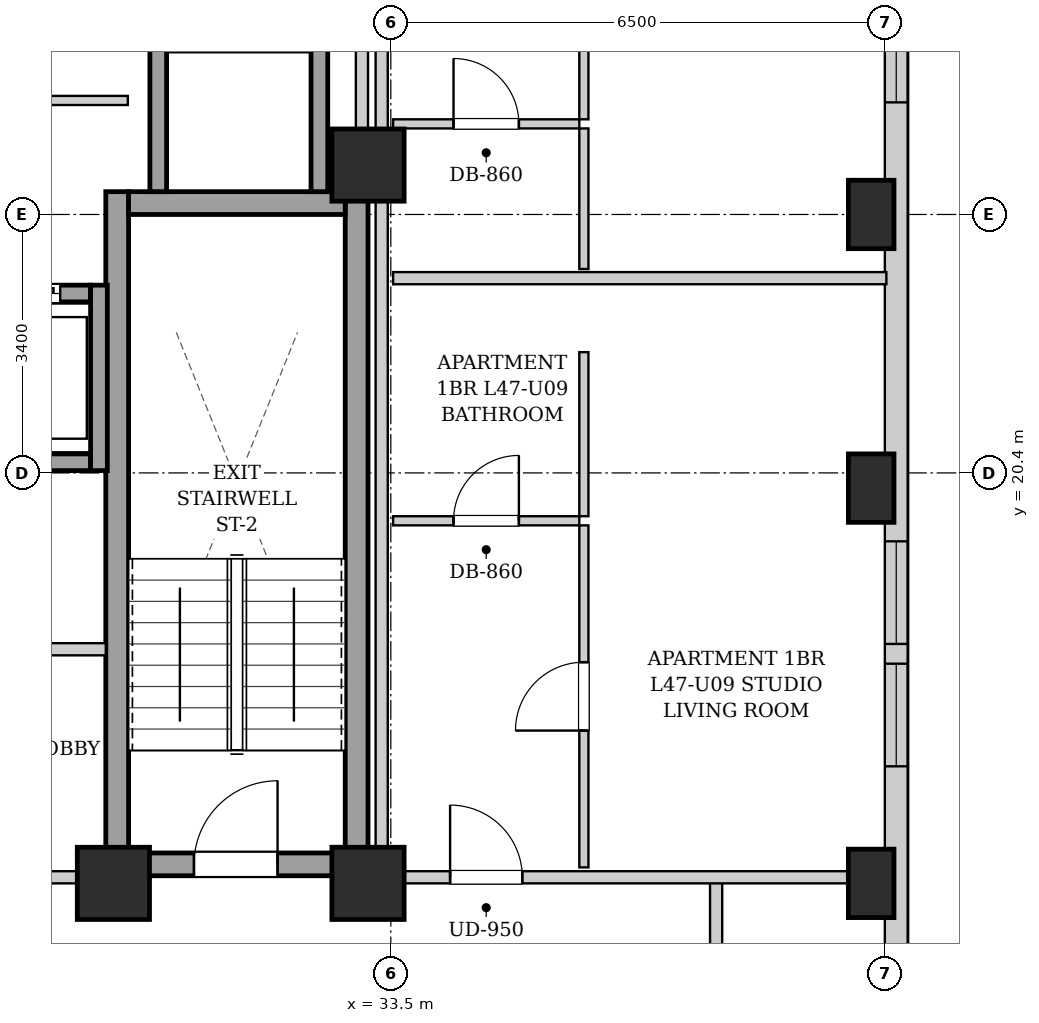
"""IFC4 building model, lengths in metres.
Left out: names, types, materials, properties, quantities, classifications, styles, units other than length and angle.
Written with IfcOpenShell. Run it as: python <this file> out.ifc"""

import sys

from ifc_helpers import new_model, si_unit, direction, frame, frame_2d, origin, origin_2d, place, context, subcontext, project, spatial, rectangle, extrude, element, fill, save


model = new_model("IFC4")
c1 = context("Model", 3, precision=1e-05, world=origin(), true_north=direction((0.0, 1.0)))
c2 = subcontext(c1, "Body", "Model", "MODEL_VIEW")
j1 = project(units=[si_unit("LENGTHUNIT", "METRE"), si_unit("PLANEANGLEUNIT", "RADIAN")], contexts=[c1])
p1 = place(None, origin())
s1 = spatial("IfcSite", under=j1, at=p1, CompositionType="ELEMENT")
p2 = place(p1, origin())
s2 = spatial("IfcBuilding", under=s1, at=p2, CompositionType="ELEMENT")
p3 = place(p2, frame((0.0, 0.0, 163.4)))
s3 = spatial("IfcBuildingStorey", under=s2, at=p3, CompositionType="ELEMENT", Elevation=163.4)
for number, where, z_axis, x_axis in (
    (1, (39.82, 15.0, 0.0), (0.0, 0.0, 1.0), (1.0, 0.0, 0.0)),
    (2, (39.82, 20.2, 0.0), (0.0, 0.0, 1.0), (1.0, 0.0, 0.0)),
    (3, (39.82, 23.8, 0.0), (0.0, 0.0, 1.0), (1.0, 0.0, 0.0)),
):
    element("IfcColumn", number, at=place(p3, frame(where, z_axis=z_axis, x_axis=x_axis)), inside=s3, PredefinedType="COLUMN", context=c2, shape_type="SweptSolid", body=[
        extrude(rectangle(XDim=0.6, YDim=0.9, at=origin_2d()), origin(), (0.0, 0.0, 1.0), 3.25),
    ])
for number, where, z_axis, x_axis in (
    (4, (29.85, 15.0, 0.0), (0.0, 0.0, 1.0), (1.0, 0.0, 0.0)),
    (5, (33.2, 15.0, 0.0), (0.0, 0.0, 1.0), (1.0, 0.0, 0.0)),
    (6, (33.2, 24.45, 0.0), (0.0, 0.0, 1.0), (1.0, 0.0, 0.0)),
):
    element("IfcColumn", number, at=place(p3, frame(where, z_axis=z_axis, x_axis=x_axis)), inside=s3, PredefinedType="COLUMN", context=c2, shape_type="SweptSolid", body=[
        extrude(rectangle(XDim=0.95, YDim=0.95, at=origin_2d()), origin(), (0.0, 0.0, 1.0), 3.25),
    ])
p4 = place(p3, frame((40.15, 40.8, 0.0), z_axis=(0.0, 0.0, 1.0), x_axis=(0.0, -1.0, 0.0)))
e7 = element("IfcWall", 7, at=p4, inside=s3, PredefinedType="SOLIDWALL", context=c2, shape_type="SweptSolid", body=[
    extrude(rectangle(XDim=34.5, YDim=0.3, at=frame_2d((17.25, 0.0))), origin(), (0.0, 0.0, 1.0), 2.99),
])
p5 = place(p4, frame((31.725, 0.0, 0.55)))
e8 = element("IfcOpeningElement", 8, at=p5, cuts=e7, PredefinedType="OPENING", context=c2, shape_type="SweptSolid", body=[
    extrude(rectangle(XDim=1.35, YDim=1.2, at=frame_2d((0.675, 0.6))), frame((0.0, 0.16, 0.0), z_axis=(0.0, -1.0, 0.0), x_axis=(1.0, 0.0, 0.0)), (0.0, 0.0, 1.0), 0.32),
])
p6 = place(p4, frame((3.0, 0.0, 0.55)))
e9 = element("IfcOpeningElement", 9, at=p6, cuts=e7, PredefinedType="OPENING", context=c2, shape_type="SweptSolid", body=[
    extrude(rectangle(XDim=1.35, YDim=1.2, at=frame_2d((0.675, 0.6))), frame((0.0, 0.16, 0.0), z_axis=(0.0, -1.0, 0.0), x_axis=(1.0, 0.0, 0.0)), (0.0, 0.0, 1.0), 0.32),
])
p7 = place(p4, frame((1.085, 0.0, 0.55)))
e10 = element("IfcOpeningElement", 10, at=p7, cuts=e7, PredefinedType="OPENING", context=c2, shape_type="SweptSolid", body=[
    extrude(rectangle(XDim=1.35, YDim=1.2, at=frame_2d((0.675, 0.6))), frame((0.0, 0.16, 0.0), z_axis=(0.0, -1.0, 0.0), x_axis=(1.0, 0.0, 0.0)), (0.0, 0.0, 1.0), 0.32),
])
p8 = place(p4, frame((21.3, 0.0, 0.55)))
e11 = element("IfcOpeningElement", 11, at=p8, cuts=e7, PredefinedType="OPENING", context=c2, shape_type="SweptSolid", body=[
    extrude(rectangle(XDim=1.35, YDim=1.2, at=frame_2d((0.675, 0.6))), frame((0.0, 0.16, 0.0), z_axis=(0.0, -1.0, 0.0), x_axis=(1.0, 0.0, 0.0)), (0.0, 0.0, 1.0), 0.32),
])
p9 = place(p4, frame((22.91, 0.0, 0.55)))
e12 = element("IfcOpeningElement", 12, at=p9, cuts=e7, PredefinedType="OPENING", context=c2, shape_type="SweptSolid", body=[
    extrude(rectangle(XDim=1.35, YDim=1.2, at=frame_2d((0.675, 0.6))), frame((0.0, 0.16, 0.0), z_axis=(0.0, -1.0, 0.0), x_axis=(1.0, 0.0, 0.0)), (0.0, 0.0, 1.0), 0.32),
])
p10 = place(p4, frame((14.175, 0.0, 0.55)))
e13 = element("IfcOpeningElement", 13, at=p10, cuts=e7, PredefinedType="OPENING", context=c2, shape_type="SweptSolid", body=[
    extrude(rectangle(XDim=1.35, YDim=1.2, at=frame_2d((0.675, 0.6))), frame((0.0, 0.16, 0.0), z_axis=(0.0, -1.0, 0.0), x_axis=(1.0, 0.0, 0.0)), (0.0, 0.0, 1.0), 0.32),
])
p11 = place(p4, frame((12.41, 0.0, 0.55)))
e14 = element("IfcOpeningElement", 14, at=p11, cuts=e7, PredefinedType="OPENING", context=c2, shape_type="SweptSolid", body=[
    extrude(rectangle(XDim=1.35, YDim=1.2, at=frame_2d((0.675, 0.6))), frame((0.0, 0.16, 0.0), z_axis=(0.0, -1.0, 0.0), x_axis=(1.0, 0.0, 0.0)), (0.0, 0.0, 1.0), 0.32),
])
for number, where, z_axis, x_axis in (
    (15, (29.9, 15.1, 0.0), (0.0, 0.0, 1.0), (0.0, 1.0, 0.0)),
    (16, (33.05, 15.1, 0.0), (0.0, 0.0, 1.0), (0.0, 1.0, 0.0)),
):
    element("IfcWall", number, at=place(p3, frame(where, z_axis=z_axis, x_axis=x_axis)), inside=s3, PredefinedType="SHEAR", context=c2, shape_type="SweptSolid", body=[
        extrude(rectangle(XDim=9.0, YDim=0.3, at=frame_2d((4.5, 0.0))), origin(), (0.0, 0.0, 1.0), 2.99),
    ])
p12 = place(p3, frame((30.05, 23.95, 0.0), z_axis=(0.0, 0.0, 1.0), x_axis=(1.0, 0.0, 0.0)))
e17 = element("IfcWall", 17, at=p12, inside=s3, PredefinedType="SHEAR", context=c2, shape_type="SweptSolid", body=[
    extrude(rectangle(XDim=2.85, YDim=0.3, at=frame_2d((1.425, 0.0))), origin(), (0.0, 0.0, 1.0), 2.99),
])
p13 = place(p3, frame((30.05, 15.25, 0.0), z_axis=(0.0, 0.0, 1.0), x_axis=(1.0, 0.0, 0.0)))
e18 = element("IfcWall", 18, at=p13, inside=s3, PredefinedType="SHEAR", context=c2, shape_type="SweptSolid", body=[
    extrude(rectangle(XDim=2.85, YDim=0.3, at=frame_2d((1.425, 0.0))), origin(), (0.0, 0.0, 1.0), 2.99),
])
p14 = place(p13, frame((0.86, 0.0, 0.0)))
e19 = element("IfcOpeningElement", 19, at=p14, cuts=e18, PredefinedType="OPENING", context=c2, shape_type="SweptSolid", body=[
    extrude(rectangle(XDim=1.1, YDim=2.05, at=frame_2d((0.55, 1.025))), frame((0.0, 0.16, 0.0), z_axis=(0.0, -1.0, 0.0), x_axis=(1.0, 0.0, 0.0)), (0.0, 0.0, 1.0), 0.32),
])
p15 = place(p3, frame((27.65, 20.54, 0.0), z_axis=(0.0, 0.0, 1.0), x_axis=(1.0, 0.0, 0.0)))
e20 = element("IfcWall", 20, at=p15, inside=s3, PredefinedType="SHEAR", context=c2, shape_type="SweptSolid", body=[
    extrude(rectangle(XDim=1.9, YDim=0.22, at=frame_2d((0.95, 0.0))), origin(), (0.0, 0.0, 1.0), 2.99),
])
p16 = place(p3, frame((27.65, 22.76, 0.0), z_axis=(0.0, 0.0, 1.0), x_axis=(1.0, 0.0, 0.0)))
e21 = element("IfcWall", 21, at=p16, inside=s3, PredefinedType="SHEAR", context=c2, shape_type="SweptSolid", body=[
    extrude(rectangle(XDim=1.9, YDim=0.22, at=frame_2d((0.95, 0.0))), origin(), (0.0, 0.0, 1.0), 2.99),
])
p17 = place(p16, frame((0.4, 0.0, 0.0)))
e22 = element("IfcOpeningElement", 22, at=p17, cuts=e21, PredefinedType="OPENING", context=c2, shape_type="SweptSolid", body=[
    extrude(rectangle(XDim=1.1, YDim=2.15, at=frame_2d((0.55, 1.075))), frame((0.0, 0.12, 0.0), z_axis=(0.0, -1.0, 0.0), x_axis=(1.0, 0.0, 0.0)), (0.0, 0.0, 1.0), 0.24),
])
p18 = place(p3, frame((29.66, 20.43, 0.0), z_axis=(0.0, 0.0, 1.0), x_axis=(0.0, 1.0, 0.0)))
e23 = element("IfcWall", 23, at=p18, inside=s3, PredefinedType="SHEAR", context=c2, shape_type="SweptSolid", body=[
    extrude(rectangle(XDim=2.44, YDim=0.22, at=frame_2d((1.22, 0.0))), origin(), (0.0, 0.0, 1.0), 2.99),
])
for number, where, z_axis, x_axis in (
    (24, (30.44, 24.1, 0.0), (0.0, 0.0, 1.0), (0.0, 1.0, 0.0)),
    (25, (32.56, 24.1, 0.0), (0.0, 0.0, 1.0), (0.0, 1.0, 0.0)),
):
    element("IfcWall", number, at=place(p3, frame(where, z_axis=z_axis, x_axis=x_axis)), inside=s3, PredefinedType="SHEAR", context=c2, shape_type="SweptSolid", body=[
        extrude(rectangle(XDim=2.07, YDim=0.22, at=frame_2d((1.035, 0.0))), origin(), (0.0, 0.0, 1.0), 2.99),
    ])
p19 = place(p3, frame((21.25, 15.08, 0.0), z_axis=(0.0, 0.0, 1.0), x_axis=(1.0, 0.0, 0.0)))
e26 = element("IfcWall", 26, at=p19, inside=s3, PredefinedType="PARTITIONING", context=c2, shape_type="SweptSolid", body=[
    extrude(rectangle(XDim=8.5, YDim=0.16, at=frame_2d((4.25, 0.0))), origin(), (0.0, 0.0, 1.0), 2.442),
])
p20 = place(p19, frame((3.725, 0.0, 0.0)))
e27 = element("IfcOpeningElement", 27, at=p20, cuts=e26, PredefinedType="OPENING", context=c2, shape_type="SweptSolid", body=[
    extrude(rectangle(XDim=1.05, YDim=2.05, at=frame_2d((0.525, 1.025))), frame((0.0, 0.09, 0.0), z_axis=(0.0, -1.0, 0.0), x_axis=(1.0, 0.0, 0.0)), (0.0, 0.0, 1.0), 0.18),
])
p21 = place(p3, frame((28.65, 18.08, 0.0), z_axis=(0.0, 0.0, 1.0), x_axis=(1.0, 0.0, 0.0)))
e28 = element("IfcWall", 28, at=p21, inside=s3, PredefinedType="PARTITIONING", context=c2, shape_type="SweptSolid", body=[
    extrude(rectangle(XDim=1.1, YDim=0.16, at=frame_2d((0.55, 0.0))), origin(), (0.0, 0.0, 1.0), 2.99),
])
p22 = place(p3, frame((33.12, 24.12, 0.0), z_axis=(0.0, 0.0, 1.0), x_axis=(0.0, 1.0, 0.0)))
e29 = element("IfcWall", 29, at=p22, inside=s3, PredefinedType="PARTITIONING", context=c2, shape_type="SweptSolid", body=[
    extrude(rectangle(XDim=4.76, YDim=0.16, at=frame_2d((2.38, 0.0))), origin(), (0.0, 0.0, 1.0), 2.99),
])
p23 = place(p3, frame((25.72, 25.3, 0.0), z_axis=(0.0, 0.0, 1.0), x_axis=(1.0, 0.0, 0.0)))
e30 = element("IfcWall", 30, at=p23, inside=s3, PredefinedType="PARTITIONING", context=c2, shape_type="SweptSolid", body=[
    extrude(rectangle(XDim=4.32, YDim=0.12, at=frame_2d((2.16, 0.0))), origin(), (0.0, 0.0, 1.0), 2.99),
])
p24 = place(p23, frame((1.65, 0.0, 0.0)))
e31 = element("IfcOpeningElement", 31, at=p24, cuts=e30, PredefinedType="OPENING", context=c2, shape_type="SweptSolid", body=[
    extrude(rectangle(XDim=0.9, YDim=2.05, at=frame_2d((0.45, 1.025))), frame((0.0, 0.07, 0.0), z_axis=(0.0, -1.0, 0.0), x_axis=(1.0, 0.0, 0.0)), (0.0, 0.0, 1.0), 0.14),
])
p25 = place(p3, frame((37.78, 13.35, 0.0), z_axis=(0.0, 0.0, 1.0), x_axis=(0.0, 1.0, 0.0)))
e32 = element("IfcWall", 32, at=p25, inside=s3, PredefinedType="PARTITIONING", context=c2, shape_type="SweptSolid", body=[
    extrude(rectangle(XDim=1.74, YDim=0.16, at=frame_2d((0.87, 0.0))), origin(), (0.0, 0.0, 1.0), 2.99),
])
p26 = place(p3, frame((33.38, 15.08, 0.0), z_axis=(0.0, 0.0, 1.0), x_axis=(1.0, 0.0, 0.0)))
e33 = element("IfcWall", 33, at=p26, inside=s3, PredefinedType="PARTITIONING", context=c2, shape_type="SweptSolid", body=[
    extrude(rectangle(XDim=6.64, YDim=0.16, at=frame_2d((3.32, 0.0))), origin(), (0.0, 0.0, 1.0), 2.442),
])
p27 = place(p26, frame((0.9, 0.0, 0.0)))
e34 = element("IfcOpeningElement", 34, at=p27, cuts=e33, PredefinedType="OPENING", context=c2, shape_type="SweptSolid", body=[
    extrude(rectangle(XDim=0.95, YDim=2.1, at=frame_2d((0.475, 1.05))), frame((0.0, 0.09, 0.0), z_axis=(0.0, -1.0, 0.0), x_axis=(1.0, 0.0, 0.0)), (0.0, 0.0, 1.0), 0.18),
])
p28 = place(p3, frame((33.53, 22.962, 0.0), z_axis=(0.0, 0.0, 1.0), x_axis=(1.0, 0.0, 0.0)))
e35 = element("IfcWall", 35, at=p28, inside=s3, PredefinedType="PARTITIONING", context=c2, shape_type="SweptSolid", body=[
    extrude(rectangle(XDim=6.49, YDim=0.16, at=frame_2d((3.245, 0.0))), origin(), (0.0, 0.0, 1.0), 2.99),
])
p29 = place(p3, frame((33.53, 19.77, 0.0), z_axis=(0.0, 0.0, 1.0), x_axis=(1.0, 0.0, 0.0)))
e36 = element("IfcWall", 36, at=p29, inside=s3, PredefinedType="PARTITIONING", context=c2, shape_type="SweptSolid", body=[
    extrude(rectangle(XDim=2.45, YDim=0.12, at=frame_2d((1.225, 0.0))), origin(), (0.0, 0.0, 1.0), 2.99),
])
p30 = place(p29, frame((0.795, 0.0, 0.0)))
e37 = element("IfcOpeningElement", 37, at=p30, cuts=e36, PredefinedType="OPENING", context=c2, shape_type="SweptSolid", body=[
    extrude(rectangle(XDim=0.86, YDim=2.05, at=frame_2d((0.43, 1.025))), frame((0.0, 0.07, 0.0), z_axis=(0.0, -1.0, 0.0), x_axis=(1.0, 0.0, 0.0)), (0.0, 0.0, 1.0), 0.14),
])
p31 = place(p3, frame((36.04, 19.83, 0.0), z_axis=(0.0, 0.0, 1.0), x_axis=(0.0, 1.0, 0.0)))
e38 = element("IfcWall", 38, at=p31, inside=s3, PredefinedType="PARTITIONING", context=c2, shape_type="SweptSolid", body=[
    extrude(rectangle(XDim=2.159, YDim=0.12, at=frame_2d((1.08, 0.0))), origin(), (0.0, 0.0, 1.0), 2.99),
])
p32 = place(p3, frame((36.04, 15.21, 0.0), z_axis=(0.0, 0.0, 1.0), x_axis=(0.0, 1.0, 0.0)))
e39 = element("IfcWall", 39, at=p32, inside=s3, PredefinedType="PARTITIONING", context=c2, shape_type="SweptSolid", body=[
    extrude(rectangle(XDim=4.5, YDim=0.12, at=frame_2d((2.25, 0.0))), origin(), (0.0, 0.0, 1.0), 2.99),
])
p33 = place(p32, frame((1.8, 0.0, 0.0)))
e40 = element("IfcOpeningElement", 40, at=p33, cuts=e39, PredefinedType="OPENING", context=c2, shape_type="SweptSolid", body=[
    extrude(rectangle(XDim=0.9, YDim=2.05, at=frame_2d((0.45, 1.025))), frame((0.0, 0.07, 0.0), z_axis=(0.0, -1.0, 0.0), x_axis=(1.0, 0.0, 0.0)), (0.0, 0.0, 1.0), 0.14),
])
p34 = place(p3, frame((33.53, 24.992, 0.0), z_axis=(0.0, 0.0, 1.0), x_axis=(1.0, 0.0, 0.0)))
e41 = element("IfcWall", 41, at=p34, inside=s3, PredefinedType="PARTITIONING", context=c2, shape_type="SweptSolid", body=[
    extrude(rectangle(XDim=2.45, YDim=0.12, at=frame_2d((1.225, 0.0))), origin(), (0.0, 0.0, 1.0), 2.99),
])
p35 = place(p34, frame((0.795, 0.0, 0.0)))
e42 = element("IfcOpeningElement", 42, at=p35, cuts=e41, PredefinedType="OPENING", context=c2, shape_type="SweptSolid", body=[
    extrude(rectangle(XDim=0.86, YDim=2.05, at=frame_2d((0.43, 1.025))), frame((0.0, 0.07, 0.0), z_axis=(0.0, -1.0, 0.0), x_axis=(1.0, 0.0, 0.0)), (0.0, 0.0, 1.0), 0.14),
])
p36 = place(p3, frame((36.04, 23.082, 0.0), z_axis=(0.0, 0.0, 1.0), x_axis=(0.0, 1.0, 0.0)))
e43 = element("IfcWall", 43, at=p36, inside=s3, PredefinedType="PARTITIONING", context=c2, shape_type="SweptSolid", body=[
    extrude(rectangle(XDim=1.85, YDim=0.12, at=frame_2d((0.925, 0.0))), origin(), (0.0, 0.0, 1.0), 2.99),
])
p37 = place(p3, frame((36.04, 25.052, 0.0), z_axis=(0.0, 0.0, 1.0), x_axis=(0.0, 1.0, 0.0)))
e44 = element("IfcWall", 44, at=p37, inside=s3, PredefinedType="PARTITIONING", context=c2, shape_type="SweptSolid", body=[
    extrude(rectangle(XDim=3.808, YDim=0.12, at=frame_2d((1.904, 0.0))), origin(), (0.0, 0.0, 1.0), 2.99),
])
p38 = place(p37, frame((1.454, 0.0, 0.0)))
e45 = element("IfcOpeningElement", 45, at=p38, cuts=e44, PredefinedType="OPENING", context=c2, shape_type="SweptSolid", body=[
    extrude(rectangle(XDim=0.9, YDim=2.05, at=frame_2d((0.45, 1.025))), frame((0.0, 0.07, 0.0), z_axis=(0.0, -1.0, 0.0), x_axis=(1.0, 0.0, 0.0)), (0.0, 0.0, 1.0), 0.14),
])
p39 = place(p3, frame((33.38, 15.02, 0.0), z_axis=(0.0, 0.0, 1.0), x_axis=(0.0, 1.0, 0.0)))
e46 = element("IfcWall", 46, at=p39, inside=s3, PredefinedType="PARTITIONING", context=c2, shape_type="SweptSolid", body=[
    extrude(rectangle(XDim=13.98, YDim=0.16, at=frame_2d((6.99, 0.0))), origin(), (0.0, 0.0, 1.0), 2.99),
])
p40 = place(p14, origin())
e47 = element("IfcDoor", 47, at=p40, inside=s3, OperationType="SINGLE_SWING_RIGHT", PredefinedType="DOOR", context=c2, shape_type="SweptSolid", body=[
    extrude(rectangle(XDim=1.1, YDim=2.05, at=frame_2d((0.55, 1.025))), frame((0.0, 0.025, 0.0), z_axis=(0.0, -1.0, 0.0), x_axis=(1.0, 0.0, 0.0)), (0.0, 0.0, 1.0), 0.05),
])
fill(e19, e47)
p41 = place(p17, origin())
e48 = element("IfcDoor", 48, at=p41, inside=s3, OperationType="SLIDING_TO_LEFT", PredefinedType="DOOR", context=c2, shape_type="SweptSolid", body=[
    extrude(rectangle(XDim=1.1, YDim=2.15, at=frame_2d((0.55, 1.075))), frame((0.0, 0.025, 0.0), z_axis=(0.0, -1.0, 0.0), x_axis=(1.0, 0.0, 0.0)), (0.0, 0.0, 1.0), 0.05),
])
fill(e22, e48)
p42 = place(p27, origin())
e49 = element("IfcDoor", 49, at=p42, inside=s3, OperationType="SINGLE_SWING_LEFT", PredefinedType="DOOR", context=c2, shape_type="SweptSolid", body=[
    extrude(rectangle(XDim=0.95, YDim=2.1, at=frame_2d((0.475, 1.05))), frame((0.0, 0.025, 0.0), z_axis=(0.0, -1.0, 0.0), x_axis=(1.0, 0.0, 0.0)), (0.0, 0.0, 1.0), 0.05),
])
fill(e34, e49)
p43 = place(p30, origin())
e50 = element("IfcDoor", 50, at=p43, inside=s3, OperationType="SINGLE_SWING_RIGHT", PredefinedType="DOOR", context=c2, shape_type="SweptSolid", body=[
    extrude(rectangle(XDim=0.86, YDim=2.05, at=frame_2d((0.43, 1.025))), frame((0.0, 0.025, 0.0), z_axis=(0.0, -1.0, 0.0), x_axis=(1.0, 0.0, 0.0)), (0.0, 0.0, 1.0), 0.05),
])
fill(e37, e50)
p44 = place(p33, origin())
e51 = element("IfcDoor", 51, at=p44, inside=s3, OperationType="SINGLE_SWING_LEFT", PredefinedType="DOOR", context=c2, shape_type="SweptSolid", body=[
    extrude(rectangle(XDim=0.9, YDim=2.05, at=frame_2d((0.45, 1.025))), frame((0.0, 0.025, 0.0), z_axis=(0.0, -1.0, 0.0), x_axis=(1.0, 0.0, 0.0)), (0.0, 0.0, 1.0), 0.05),
])
fill(e40, e51)
p45 = place(p35, origin())
e52 = element("IfcDoor", 52, at=p45, inside=s3, OperationType="SINGLE_SWING_LEFT", PredefinedType="DOOR", context=c2, shape_type="SweptSolid", body=[
    extrude(rectangle(XDim=0.86, YDim=2.05, at=frame_2d((0.43, 1.025))), frame((0.0, 0.025, 0.0), z_axis=(0.0, -1.0, 0.0), x_axis=(1.0, 0.0, 0.0)), (0.0, 0.0, 1.0), 0.05),
])
fill(e42, e52)
p46 = place(p8, origin())
e53 = element("IfcWindow", 53, at=p46, inside=s3, PartitioningType="SINGLE_PANEL", PredefinedType="WINDOW", context=c2, shape_type="SweptSolid", body=[
    extrude(rectangle(XDim=1.35, YDim=1.2, at=frame_2d((0.675, 0.6))), frame((0.0, 0.03, 0.0), z_axis=(0.0, -1.0, 0.0), x_axis=(1.0, 0.0, 0.0)), (0.0, 0.0, 1.0), 0.06),
])
fill(e11, e53)
p47 = place(p9, origin())
e54 = element("IfcWindow", 54, at=p47, inside=s3, PartitioningType="SINGLE_PANEL", PredefinedType="WINDOW", context=c2, shape_type="SweptSolid", body=[
    extrude(rectangle(XDim=1.35, YDim=1.2, at=frame_2d((0.675, 0.6))), frame((0.0, 0.03, 0.0), z_axis=(0.0, -1.0, 0.0), x_axis=(1.0, 0.0, 0.0)), (0.0, 0.0, 1.0), 0.06),
])
fill(e12, e54)
p48 = place(p10, origin())
e55 = element("IfcWindow", 55, at=p48, inside=s3, PartitioningType="SINGLE_PANEL", PredefinedType="WINDOW", context=c2, shape_type="SweptSolid", body=[
    extrude(rectangle(XDim=1.35, YDim=1.2, at=frame_2d((0.675, 0.6))), frame((0.0, 0.03, 0.0), z_axis=(0.0, -1.0, 0.0), x_axis=(1.0, 0.0, 0.0)), (0.0, 0.0, 1.0), 0.06),
])
fill(e13, e55)
save(model, sys.argv[1])
